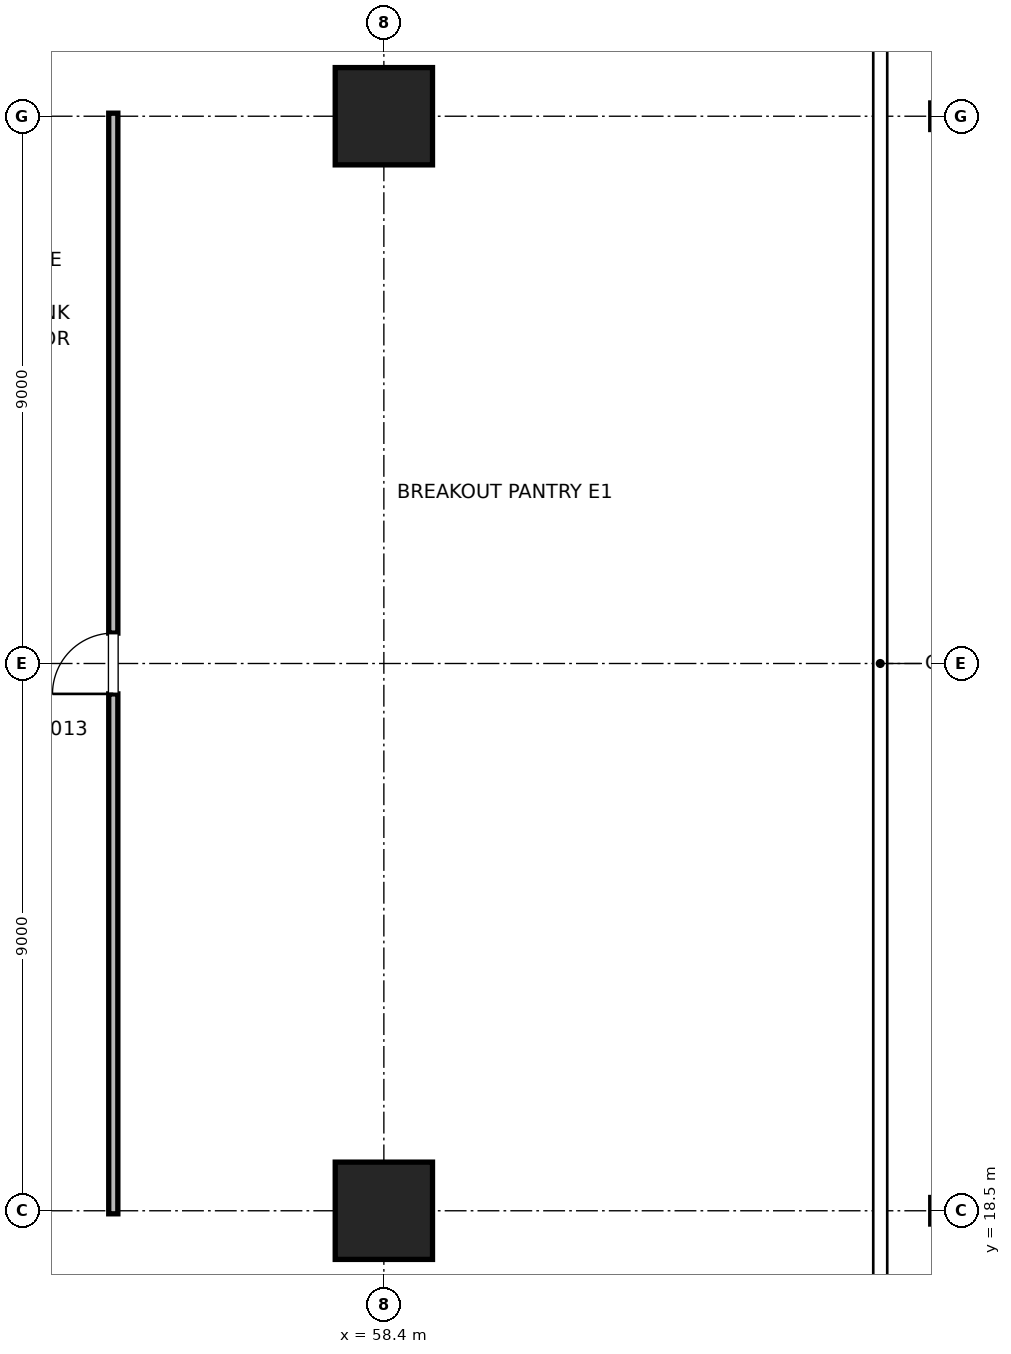
"""IFC4 building model, lengths in metres.
Left out: names, types, materials, properties, quantities, classifications, styles, units other than length and angle.
Written with IfcOpenShell. Run it as: python <this file> out.ifc"""

import sys

from ifc_helpers import new_model, si_unit, direction, frame, frame_2d, origin, origin_2d, place, context, subcontext, project, spatial, rectangle, i_section, extrude, element, fill, save


model = new_model("IFC4")
c1 = context("Model", 3, precision=1e-05, world=origin(), true_north=direction((0.0, 1.0)))
c2 = subcontext(c1, "Body", "Model", "MODEL_VIEW")
j1 = project(units=[si_unit("LENGTHUNIT", "METRE"), si_unit("PLANEANGLEUNIT", "RADIAN")], contexts=[c1])
p1 = place(None, origin())
s1 = spatial("IfcSite", under=j1, at=p1, CompositionType="ELEMENT")
p2 = place(p1, origin())
s2 = spatial("IfcBuilding", under=s1, at=p2, CompositionType="ELEMENT")
p3 = place(p2, frame((0.0, 0.0, 148.4)))
s3 = spatial("IfcBuildingStorey", under=s2, at=p3, CompositionType="ELEMENT", Elevation=148.4)
for number, where, z_axis, x_axis in (
    (1, (58.4, 18.5, 0.0), (0.0, 0.0, 1.0), (1.0, 0.0, 0.0)),
    (2, (58.4, 36.5, 0.0), (0.0, 0.0, 1.0), (1.0, 0.0, 0.0)),
):
    element("IfcColumn", number, at=place(p3, frame(where, z_axis=z_axis, x_axis=x_axis)), inside=s3, PredefinedType="COLUMN", context=c2, shape_type="SweptSolid", body=[
        extrude(rectangle(XDim=1.6, YDim=1.6, at=origin_2d()), origin(), (0.0, 0.0, 1.0), 4.0),
    ])
for number, where, z_axis, x_axis in (
    (3, (67.6, 18.5, 0.0), (0.0, 0.0, 1.0), (1.0, 0.0, 0.0)),
    (4, (67.6, 36.5, 0.0), (0.0, 0.0, 1.0), (1.0, 0.0, 0.0)),
):
    element("IfcColumn", number, at=place(p3, frame(where, z_axis=z_axis, x_axis=x_axis)), inside=s3, PredefinedType="COLUMN", context=c2, shape_type="SweptSolid", body=[
        extrude(i_section(OverallWidth=0.412, OverallDepth=0.437, WebThickness=0.036, FlangeThickness=0.058, FilletRadius=0.015, at=origin_2d()), origin(), (0.0, 0.0, 1.0), 4.0),
    ])
p4 = place(p3, frame((53.95, 18.45, 0.0), z_axis=(0.0, 0.0, 1.0), x_axis=(0.0, 1.0, 0.0)))
e5 = element("IfcWall", 5, at=p4, inside=s3, PredefinedType="PARTITIONING", context=c2, shape_type="SweptSolid", body=[
    extrude(rectangle(XDim=18.1, YDim=0.15, at=frame_2d((9.05, 0.0))), origin(), (0.0, 0.0, 1.0), 2.85),
])
p5 = place(p4, frame((8.55, 0.0, 0.0)))
e6 = element("IfcOpeningElement", 6, at=p5, cuts=e5, PredefinedType="OPENING", context=c2, shape_type="SweptSolid", body=[
    extrude(rectangle(XDim=1.0, YDim=2.15, at=frame_2d((0.5, 1.075))), frame((0.0, 0.075, 0.0), z_axis=(0.0, -1.0, 0.0), x_axis=(1.0, 0.0, 0.0)), (0.0, 0.0, 1.0), 0.15),
])
p6 = place(p5, origin())
e7 = element("IfcDoor", 7, at=p6, inside=s3, OperationType="SINGLE_SWING_LEFT", PredefinedType="DOOR", context=c2, shape_type="SweptSolid", body=[
    extrude(rectangle(XDim=1.0, YDim=2.15, at=frame_2d((0.5, 1.075))), frame((0.0, 0.025, 0.0), z_axis=(0.0, -1.0, 0.0), x_axis=(1.0, 0.0, 0.0)), (0.0, 0.0, 1.0), 0.05),
])
fill(e6, e7)
save(model, sys.argv[1])
